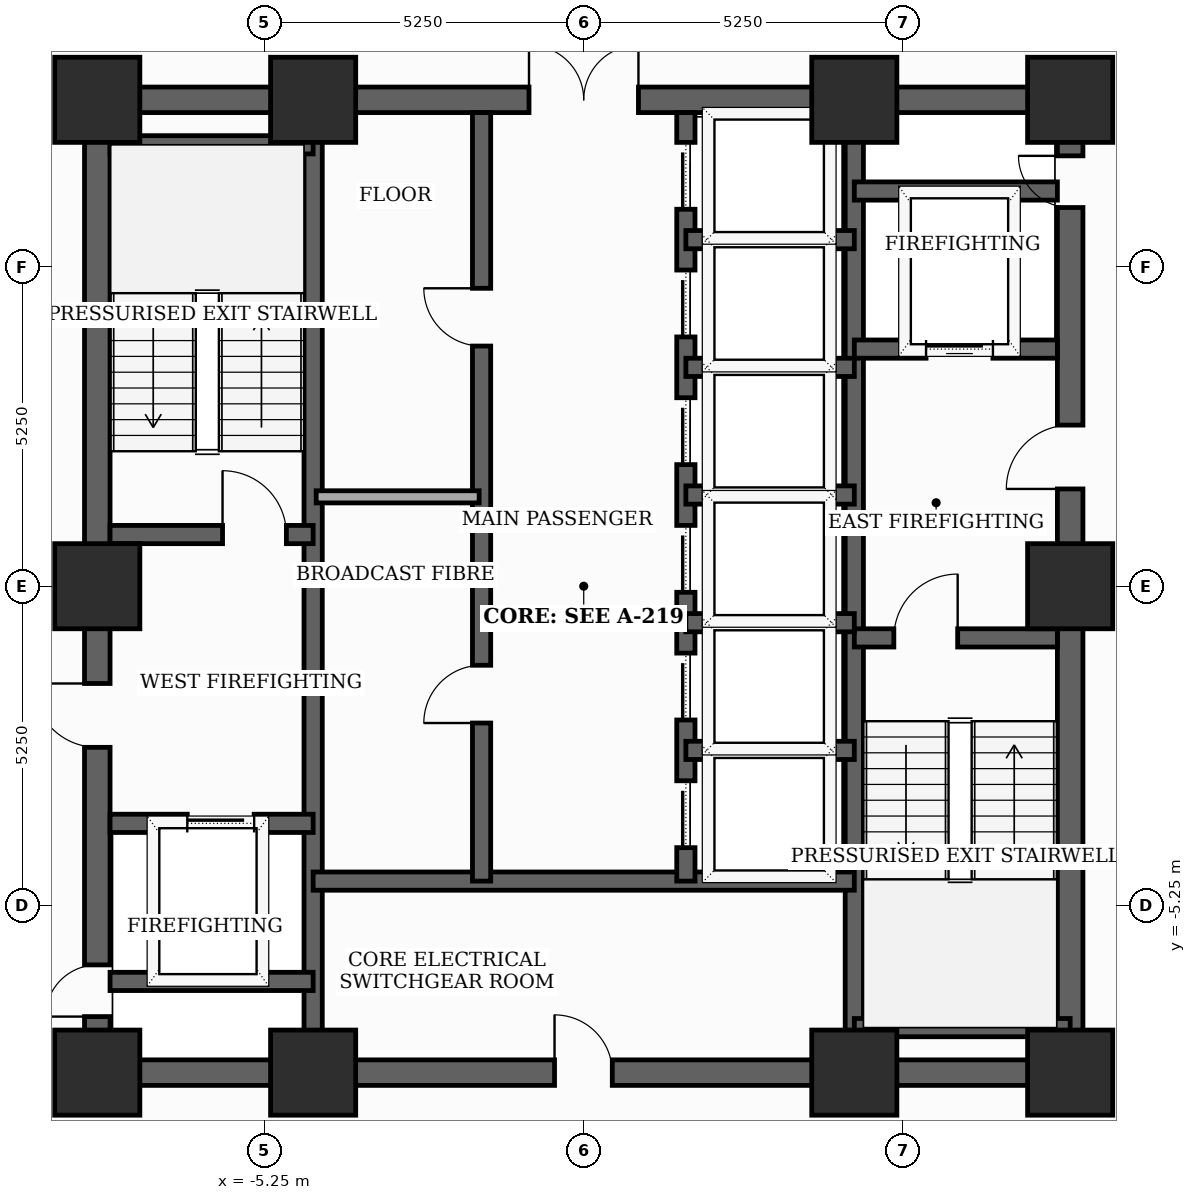
"""IFC4 building model, lengths in metres.
Left out: names, types, materials, properties, quantities, classifications, styles, units other than length and angle.
Written with IfcOpenShell. Run it as: python <this file> out.ifc"""

import sys

from ifc_helpers import new_model, si_unit, direction, frame, frame_2d, origin, origin_2d, place, context, subcontext, project, spatial, rectangle, extrude, element, fill, save


model = new_model("IFC4")
c1 = context("Model", 3, precision=1e-05, world=origin(), true_north=direction((0.0, 1.0)))
c2 = subcontext(c1, "Body", "Model", "MODEL_VIEW")
j1 = project(units=[si_unit("LENGTHUNIT", "METRE"), si_unit("PLANEANGLEUNIT", "RADIAN")], contexts=[c1])
p1 = place(None, origin())
s1 = spatial("IfcSite", under=j1, at=p1, CompositionType="ELEMENT")
p2 = place(p1, origin())
s2 = spatial("IfcBuilding", under=s1, at=p2, CompositionType="ELEMENT")
p3 = place(p2, frame((0.0, 0.0, 154.6)))
s3 = spatial("IfcBuildingStorey", under=s2, at=p3, CompositionType="ELEMENT", Elevation=154.6)
for number, where, z_axis, x_axis in (
    (1, (-8.0, -8.0, 0.0), (0.0, 0.0, 1.0), (1.0, 0.0, 0.0)),
    (2, (-4.45, -8.0, 0.0), (0.0, 0.0, 1.0), (1.0, 0.0, 0.0)),
    (3, (4.45, -8.0, 0.0), (0.0, 0.0, 1.0), (1.0, 0.0, 0.0)),
    (4, (8.0, -8.0, 0.0), (0.0, 0.0, 1.0), (1.0, 0.0, 0.0)),
    (5, (8.0, 0.0, 0.0), (0.0, 0.0, 1.0), (1.0, 0.0, 0.0)),
    (6, (8.0, 8.0, 0.0), (0.0, 0.0, 1.0), (1.0, 0.0, 0.0)),
    (7, (4.45, 8.0, 0.0), (0.0, 0.0, 1.0), (1.0, 0.0, 0.0)),
    (8, (-4.45, 8.0, 0.0), (0.0, 0.0, 1.0), (1.0, 0.0, 0.0)),
    (9, (-8.0, 8.0, 0.0), (0.0, 0.0, 1.0), (1.0, 0.0, 0.0)),
    (10, (-8.0, 0.0, 0.0), (0.0, 0.0, 1.0), (1.0, 0.0, 0.0)),
):
    element("IfcColumn", number, at=place(p3, frame(where, z_axis=z_axis, x_axis=x_axis)), inside=s3, PredefinedType="COLUMN", context=c2, shape_type="SweptSolid", body=[
        extrude(rectangle(XDim=1.4, YDim=1.4, at=origin_2d()), origin(), (0.0, 0.0, 1.0), 3.7),
    ])
p4 = place(p3, frame((-8.0, -8.0, 0.0), z_axis=(0.0, 0.0, 1.0), x_axis=(0.0, 1.0, 0.0)))
e11 = element("IfcWall", 11, at=p4, inside=s3, PredefinedType="SHEAR", context=c2, shape_type="SweptSolid", body=[
    extrude(rectangle(XDim=16.0, YDim=0.42, at=frame_2d((8.0, 0.0))), origin(), (0.0, 0.0, 1.0), 3.5),
])
p5 = place(p4, frame((0.922, 0.0, 0.0)))
e12 = element("IfcOpeningElement", 12, at=p5, cuts=e11, PredefinedType="OPENING", context=c2, shape_type="SweptSolid", body=[
    extrude(rectangle(XDim=0.85, YDim=2.02, at=frame_2d((0.425, 1.01))), frame((0.0, 0.22, 0.0), z_axis=(0.0, -1.0, 0.0), x_axis=(1.0, 0.0, 0.0)), (0.0, 0.0, 1.0), 0.44),
])
p6 = place(p4, frame((5.35, 0.0, 0.0)))
e13 = element("IfcOpeningElement", 13, at=p6, cuts=e11, PredefinedType="OPENING", context=c2, shape_type="SweptSolid", body=[
    extrude(rectangle(XDim=1.05, YDim=2.15, at=frame_2d((0.525, 1.075))), frame((0.0, 0.22, 0.0), z_axis=(0.0, -1.0, 0.0), x_axis=(1.0, 0.0, 0.0)), (0.0, 0.0, 1.0), 0.44),
])
p7 = place(p3, frame((8.0, -8.0, 0.0), z_axis=(0.0, 0.0, 1.0), x_axis=(0.0, 1.0, 0.0)))
e14 = element("IfcWall", 14, at=p7, inside=s3, PredefinedType="SHEAR", context=c2, shape_type="SweptSolid", body=[
    extrude(rectangle(XDim=16.0, YDim=0.42, at=frame_2d((8.0, 0.0))), origin(), (0.0, 0.0, 1.0), 3.5),
])
p8 = place(p7, frame((9.6, 0.0, 0.0)))
e15 = element("IfcOpeningElement", 15, at=p8, cuts=e14, PredefinedType="OPENING", context=c2, shape_type="SweptSolid", body=[
    extrude(rectangle(XDim=1.05, YDim=2.15, at=frame_2d((0.525, 1.075))), frame((0.0, 0.22, 0.0), z_axis=(0.0, -1.0, 0.0), x_axis=(1.0, 0.0, 0.0)), (0.0, 0.0, 1.0), 0.44),
])
p9 = place(p7, frame((14.229, 0.0, 0.0)))
e16 = element("IfcOpeningElement", 16, at=p9, cuts=e14, PredefinedType="OPENING", context=c2, shape_type="SweptSolid", body=[
    extrude(rectangle(XDim=0.85, YDim=2.02, at=frame_2d((0.425, 1.01))), frame((0.0, 0.22, 0.0), z_axis=(0.0, -1.0, 0.0), x_axis=(1.0, 0.0, 0.0)), (0.0, 0.0, 1.0), 0.44),
])
p10 = place(p3, frame((-8.0, -8.0, 0.0), z_axis=(0.0, 0.0, 1.0), x_axis=(1.0, 0.0, 0.0)))
e17 = element("IfcWall", 17, at=p10, inside=s3, PredefinedType="SHEAR", context=c2, shape_type="SweptSolid", body=[
    extrude(rectangle(XDim=16.0, YDim=0.42, at=frame_2d((8.0, 0.0))), origin(), (0.0, 0.0, 1.0), 3.5),
])
p11 = place(p10, frame((7.52, 0.0, 0.0)))
e18 = element("IfcOpeningElement", 18, at=p11, cuts=e17, PredefinedType="OPENING", context=c2, shape_type="SweptSolid", body=[
    extrude(rectangle(XDim=0.95, YDim=2.1, at=frame_2d((0.475, 1.05))), frame((0.0, 0.22, 0.0), z_axis=(0.0, -1.0, 0.0), x_axis=(1.0, 0.0, 0.0)), (0.0, 0.0, 1.0), 0.44),
])
p12 = place(p3, frame((-8.0, 8.0, 0.0), z_axis=(0.0, 0.0, 1.0), x_axis=(1.0, 0.0, 0.0)))
e19 = element("IfcWall", 19, at=p12, inside=s3, PredefinedType="SHEAR", context=c2, shape_type="SweptSolid", body=[
    extrude(rectangle(XDim=16.0, YDim=0.42, at=frame_2d((8.0, 0.0))), origin(), (0.0, 0.0, 1.0), 3.5),
])
p13 = place(p12, frame((7.1, 0.0, 0.0)))
e20 = element("IfcOpeningElement", 20, at=p13, cuts=e19, PredefinedType="OPENING", context=c2, shape_type="SweptSolid", body=[
    extrude(rectangle(XDim=1.8, YDim=2.15, at=frame_2d((0.9, 1.075))), frame((0.0, 0.22, 0.0), z_axis=(0.0, -1.0, 0.0), x_axis=(1.0, 0.0, 0.0)), (0.0, 0.0, 1.0), 0.44),
])
for number, where, z_axis, x_axis in (
    (21, (-4.45, -7.79, 0.0), (0.0, 0.0, 1.0), (0.0, 1.0, 0.0)),
    (22, (4.45, -7.79, 0.0), (0.0, 0.0, 1.0), (0.0, 1.0, 0.0)),
):
    element("IfcWall", number, at=place(p3, frame(where, z_axis=z_axis, x_axis=x_axis)), inside=s3, PredefinedType="SHEAR", context=c2, shape_type="SweptSolid", body=[
        extrude(rectangle(XDim=15.58, YDim=0.3, at=frame_2d((7.79, 0.0))), origin(), (0.0, 0.0, 1.0), 3.5),
    ])
p14 = place(p3, frame((-7.79, 0.85, 0.0), z_axis=(0.0, 0.0, 1.0), x_axis=(1.0, 0.0, 0.0)))
e23 = element("IfcWall", 23, at=p14, inside=s3, PredefinedType="SHEAR", context=c2, shape_type="SweptSolid", body=[
    extrude(rectangle(XDim=3.34, YDim=0.3, at=frame_2d((1.67, 0.0))), origin(), (0.0, 0.0, 1.0), 3.5),
])
p15 = place(p14, frame((1.85, 0.0, 0.0)))
e24 = element("IfcOpeningElement", 24, at=p15, cuts=e23, PredefinedType="OPENING", context=c2, shape_type="SweptSolid", body=[
    extrude(rectangle(XDim=1.05, YDim=2.15, at=frame_2d((0.525, 1.075))), frame((0.0, 0.16, 0.0), z_axis=(0.0, -1.0, 0.0), x_axis=(1.0, 0.0, 0.0)), (0.0, 0.0, 1.0), 0.32),
])
p16 = place(p3, frame((-7.79, 7.26, 0.0), z_axis=(0.0, 0.0, 1.0), x_axis=(1.0, 0.0, 0.0)))
e25 = element("IfcWall", 25, at=p16, inside=s3, PredefinedType="SHEAR", context=c2, shape_type="SweptSolid", body=[
    extrude(rectangle(XDim=3.34, YDim=0.3, at=frame_2d((1.67, 0.0))), origin(), (0.0, 0.0, 1.0), 3.5),
])
p17 = place(p3, frame((4.45, -0.85, 0.0), z_axis=(0.0, 0.0, 1.0), x_axis=(1.0, 0.0, 0.0)))
e26 = element("IfcWall", 26, at=p17, inside=s3, PredefinedType="SHEAR", context=c2, shape_type="SweptSolid", body=[
    extrude(rectangle(XDim=3.34, YDim=0.3, at=frame_2d((1.67, 0.0))), origin(), (0.0, 0.0, 1.0), 3.5),
])
p18 = place(p17, frame((0.65, 0.0, 0.0)))
e27 = element("IfcOpeningElement", 27, at=p18, cuts=e26, PredefinedType="OPENING", context=c2, shape_type="SweptSolid", body=[
    extrude(rectangle(XDim=1.05, YDim=2.15, at=frame_2d((0.525, 1.075))), frame((0.0, 0.16, 0.0), z_axis=(0.0, -1.0, 0.0), x_axis=(1.0, 0.0, 0.0)), (0.0, 0.0, 1.0), 0.32),
])
p19 = place(p3, frame((4.45, -7.26, 0.0), z_axis=(0.0, 0.0, 1.0), x_axis=(1.0, 0.0, 0.0)))
e28 = element("IfcWall", 28, at=p19, inside=s3, PredefinedType="SHEAR", context=c2, shape_type="SweptSolid", body=[
    extrude(rectangle(XDim=3.55, YDim=0.3, at=frame_2d((1.775, 0.0))), origin(), (0.0, 0.0, 1.0), 3.5),
])
p20 = place(p3, frame((-7.79, -3.9, 0.0), z_axis=(0.0, 0.0, 1.0), x_axis=(1.0, 0.0, 0.0)))
e29 = element("IfcWall", 29, at=p20, inside=s3, PredefinedType="SHEAR", context=c2, shape_type="SweptSolid", body=[
    extrude(rectangle(XDim=3.34, YDim=0.3, at=frame_2d((1.67, 0.0))), origin(), (0.0, 0.0, 1.0), 3.5),
])
p21 = place(p20, frame((1.27, 0.0, 0.0)))
e30 = element("IfcOpeningElement", 30, at=p21, cuts=e29, PredefinedType="OPENING", context=c2, shape_type="SweptSolid", body=[
    extrude(rectangle(XDim=1.1, YDim=2.1, at=frame_2d((0.55, 1.05))), frame((0.0, 0.16, 0.0), z_axis=(0.0, -1.0, 0.0), x_axis=(1.0, 0.0, 0.0)), (0.0, 0.0, 1.0), 0.32),
])
p22 = place(p3, frame((-7.79, -6.5, 0.0), z_axis=(0.0, 0.0, 1.0), x_axis=(1.0, 0.0, 0.0)))
e31 = element("IfcWall", 31, at=p22, inside=s3, PredefinedType="SHEAR", context=c2, shape_type="SweptSolid", body=[
    extrude(rectangle(XDim=3.34, YDim=0.3, at=frame_2d((1.67, 0.0))), origin(), (0.0, 0.0, 1.0), 3.5),
])
p23 = place(p3, frame((4.45, 3.9, 0.0), z_axis=(0.0, 0.0, 1.0), x_axis=(1.0, 0.0, 0.0)))
e32 = element("IfcWall", 32, at=p23, inside=s3, PredefinedType="SHEAR", context=c2, shape_type="SweptSolid", body=[
    extrude(rectangle(XDim=3.34, YDim=0.3, at=frame_2d((1.67, 0.0))), origin(), (0.0, 0.0, 1.0), 3.5),
])
p24 = place(p23, frame((1.18, 0.0, 0.0)))
e33 = element("IfcOpeningElement", 33, at=p24, cuts=e32, PredefinedType="OPENING", context=c2, shape_type="SweptSolid", body=[
    extrude(rectangle(XDim=1.1, YDim=2.1, at=frame_2d((0.55, 1.05))), frame((0.0, 0.16, 0.0), z_axis=(0.0, -1.0, 0.0), x_axis=(1.0, 0.0, 0.0)), (0.0, 0.0, 1.0), 0.32),
])
p25 = place(p3, frame((4.45, 6.5, 0.0), z_axis=(0.0, 0.0, 1.0), x_axis=(1.0, 0.0, 0.0)))
e34 = element("IfcWall", 34, at=p25, inside=s3, PredefinedType="SHEAR", context=c2, shape_type="SweptSolid", body=[
    extrude(rectangle(XDim=3.34, YDim=0.3, at=frame_2d((1.67, 0.0))), origin(), (0.0, 0.0, 1.0), 3.5),
])
p26 = place(p3, frame((-4.45, -4.85, 0.0), z_axis=(0.0, 0.0, 1.0), x_axis=(1.0, 0.0, 0.0)))
e35 = element("IfcWall", 35, at=p26, inside=s3, PredefinedType="SHEAR", context=c2, shape_type="SweptSolid", body=[
    extrude(rectangle(XDim=8.9, YDim=0.3, at=frame_2d((4.45, 0.0))), origin(), (0.0, 0.0, 1.0), 3.5),
])
p27 = place(p3, frame((-1.68, -4.85, 0.0), z_axis=(0.0, 0.0, 1.0), x_axis=(0.0, 1.0, 0.0)))
e36 = element("IfcWall", 36, at=p27, inside=s3, PredefinedType="SHEAR", context=c2, shape_type="SweptSolid", body=[
    extrude(rectangle(XDim=12.64, YDim=0.3, at=frame_2d((6.32, 0.0))), origin(), (0.0, 0.0, 1.0), 3.5),
])
p28 = place(p27, frame((2.6, 0.0, 0.0)))
e37 = element("IfcOpeningElement", 37, at=p28, cuts=e36, PredefinedType="OPENING", context=c2, shape_type="SweptSolid", body=[
    extrude(rectangle(XDim=0.95, YDim=2.1, at=frame_2d((0.475, 1.05))), frame((0.0, 0.16, 0.0), z_axis=(0.0, -1.0, 0.0), x_axis=(1.0, 0.0, 0.0)), (0.0, 0.0, 1.0), 0.32),
])
p29 = place(p27, frame((8.8, 0.0, 0.0)))
e38 = element("IfcOpeningElement", 38, at=p29, cuts=e36, PredefinedType="OPENING", context=c2, shape_type="SweptSolid", body=[
    extrude(rectangle(XDim=0.95, YDim=2.1, at=frame_2d((0.475, 1.05))), frame((0.0, 0.16, 0.0), z_axis=(0.0, -1.0, 0.0), x_axis=(1.0, 0.0, 0.0)), (0.0, 0.0, 1.0), 0.32),
])
p30 = place(p3, frame((1.68, -4.85, 0.0), z_axis=(0.0, 0.0, 1.0), x_axis=(0.0, 1.0, 0.0)))
e39 = element("IfcWall", 39, at=p30, inside=s3, PredefinedType="SHEAR", context=c2, shape_type="SweptSolid", body=[
    extrude(rectangle(XDim=12.64, YDim=0.3, at=frame_2d((6.32, 0.0))), origin(), (0.0, 0.0, 1.0), 3.5),
])
p31 = place(p30, frame((0.55, 0.0, 0.0)))
e40 = element("IfcOpeningElement", 40, at=p31, cuts=e39, PredefinedType="OPENING", context=c2, shape_type="SweptSolid", body=[
    extrude(rectangle(XDim=1.1, YDim=2.1, at=frame_2d((0.55, 1.05))), frame((0.0, 0.16, 0.0), z_axis=(0.0, -1.0, 0.0), x_axis=(1.0, 0.0, 0.0)), (0.0, 0.0, 1.0), 0.32),
])
p32 = place(p30, frame((2.65, 0.0, 0.0)))
e41 = element("IfcOpeningElement", 41, at=p32, cuts=e39, PredefinedType="OPENING", context=c2, shape_type="SweptSolid", body=[
    extrude(rectangle(XDim=1.1, YDim=2.1, at=frame_2d((0.55, 1.05))), frame((0.0, 0.16, 0.0), z_axis=(0.0, -1.0, 0.0), x_axis=(1.0, 0.0, 0.0)), (0.0, 0.0, 1.0), 0.32),
])
p33 = place(p30, frame((4.75, 0.0, 0.0)))
e42 = element("IfcOpeningElement", 42, at=p33, cuts=e39, PredefinedType="OPENING", context=c2, shape_type="SweptSolid", body=[
    extrude(rectangle(XDim=1.1, YDim=2.1, at=frame_2d((0.55, 1.05))), frame((0.0, 0.16, 0.0), z_axis=(0.0, -1.0, 0.0), x_axis=(1.0, 0.0, 0.0)), (0.0, 0.0, 1.0), 0.32),
])
p34 = place(p30, frame((6.85, 0.0, 0.0)))
e43 = element("IfcOpeningElement", 43, at=p34, cuts=e39, PredefinedType="OPENING", context=c2, shape_type="SweptSolid", body=[
    extrude(rectangle(XDim=1.1, YDim=2.1, at=frame_2d((0.55, 1.05))), frame((0.0, 0.16, 0.0), z_axis=(0.0, -1.0, 0.0), x_axis=(1.0, 0.0, 0.0)), (0.0, 0.0, 1.0), 0.32),
])
p35 = place(p30, frame((8.95, 0.0, 0.0)))
e44 = element("IfcOpeningElement", 44, at=p35, cuts=e39, PredefinedType="OPENING", context=c2, shape_type="SweptSolid", body=[
    extrude(rectangle(XDim=1.1, YDim=2.1, at=frame_2d((0.55, 1.05))), frame((0.0, 0.16, 0.0), z_axis=(0.0, -1.0, 0.0), x_axis=(1.0, 0.0, 0.0)), (0.0, 0.0, 1.0), 0.32),
])
p36 = place(p30, frame((11.05, 0.0, 0.0)))
e45 = element("IfcOpeningElement", 45, at=p36, cuts=e39, PredefinedType="OPENING", context=c2, shape_type="SweptSolid", body=[
    extrude(rectangle(XDim=1.1, YDim=2.1, at=frame_2d((0.55, 1.05))), frame((0.0, 0.16, 0.0), z_axis=(0.0, -1.0, 0.0), x_axis=(1.0, 0.0, 0.0)), (0.0, 0.0, 1.0), 0.32),
])
for number, where, z_axis, x_axis in (
    (46, (1.68, 1.5, 0.0), (0.0, 0.0, 1.0), (1.0, 0.0, 0.0)),
    (47, (1.68, 3.6, 0.0), (0.0, 0.0, 1.0), (1.0, 0.0, 0.0)),
    (48, (1.68, 5.7, 0.0), (0.0, 0.0, 1.0), (1.0, 0.0, 0.0)),
    (49, (1.68, -2.7, 0.0), (0.0, 0.0, 1.0), (1.0, 0.0, 0.0)),
    (50, (1.68, -0.6, 0.0), (0.0, 0.0, 1.0), (1.0, 0.0, 0.0)),
):
    element("IfcWall", number, at=place(p3, frame(where, z_axis=z_axis, x_axis=x_axis)), inside=s3, PredefinedType="SHEAR", context=c2, shape_type="SweptSolid", body=[
        extrude(rectangle(XDim=2.77, YDim=0.3, at=frame_2d((1.385, 0.0))), origin(), (0.0, 0.0, 1.0), 3.5),
    ])
p37 = place(p3, frame((-4.4, 1.47, 0.0), z_axis=(0.0, 0.0, 1.0), x_axis=(1.0, 0.0, 0.0)))
e51 = element("IfcWall", 51, at=p37, inside=s3, PredefinedType="SOLIDWALL", context=c2, shape_type="SweptSolid", body=[
    extrude(rectangle(XDim=2.68, YDim=0.2, at=frame_2d((1.34, 0.0))), origin(), (0.0, 0.0, 1.0), 3.5),
])
p38 = place(p5, origin())
e52 = element("IfcDoor", 52, at=p38, inside=s3, OperationType="SINGLE_SWING_LEFT", PredefinedType="TRAPDOOR", context=c2, shape_type="SweptSolid", body=[
    extrude(rectangle(XDim=0.85, YDim=2.02, at=frame_2d((0.425, 1.01))), frame((0.0, 0.025, 0.0), z_axis=(0.0, -1.0, 0.0), x_axis=(1.0, 0.0, 0.0)), (0.0, 0.0, 1.0), 0.05),
])
fill(e12, e52)
p39 = place(p6, origin())
e53 = element("IfcDoor", 53, at=p39, inside=s3, OperationType="SINGLE_SWING_RIGHT", PredefinedType="DOOR", context=c2, shape_type="SweptSolid", body=[
    extrude(rectangle(XDim=1.05, YDim=2.15, at=frame_2d((0.525, 1.075))), frame((0.0, 0.025, 0.0), z_axis=(0.0, -1.0, 0.0), x_axis=(1.0, 0.0, 0.0)), (0.0, 0.0, 1.0), 0.05),
])
fill(e13, e53)
p40 = place(p8, origin())
e54 = element("IfcDoor", 54, at=p40, inside=s3, OperationType="SINGLE_SWING_LEFT", PredefinedType="DOOR", context=c2, shape_type="SweptSolid", body=[
    extrude(rectangle(XDim=1.05, YDim=2.15, at=frame_2d((0.525, 1.075))), frame((0.0, 0.025, 0.0), z_axis=(0.0, -1.0, 0.0), x_axis=(1.0, 0.0, 0.0)), (0.0, 0.0, 1.0), 0.05),
])
fill(e15, e54)
p41 = place(p9, origin())
e55 = element("IfcDoor", 55, at=p41, inside=s3, OperationType="SINGLE_SWING_RIGHT", PredefinedType="TRAPDOOR", context=c2, shape_type="SweptSolid", body=[
    extrude(rectangle(XDim=0.85, YDim=2.02, at=frame_2d((0.425, 1.01))), frame((0.0, 0.025, 0.0), z_axis=(0.0, -1.0, 0.0), x_axis=(1.0, 0.0, 0.0)), (0.0, 0.0, 1.0), 0.05),
])
fill(e16, e55)
p42 = place(p11, origin())
e56 = element("IfcDoor", 56, at=p42, inside=s3, OperationType="SINGLE_SWING_LEFT", PredefinedType="DOOR", context=c2, shape_type="SweptSolid", body=[
    extrude(rectangle(XDim=0.95, YDim=2.1, at=frame_2d((0.475, 1.05))), frame((0.0, 0.025, 0.0), z_axis=(0.0, -1.0, 0.0), x_axis=(1.0, 0.0, 0.0)), (0.0, 0.0, 1.0), 0.05),
])
fill(e18, e56)
p43 = place(p13, origin())
e57 = element("IfcDoor", 57, at=p43, inside=s3, OperationType="DOUBLE_DOOR_SINGLE_SWING", PredefinedType="DOOR", context=c2, shape_type="SweptSolid", body=[
    extrude(rectangle(XDim=1.8, YDim=2.15, at=frame_2d((0.9, 1.075))), frame((0.0, 0.025, 0.0), z_axis=(0.0, -1.0, 0.0), x_axis=(1.0, 0.0, 0.0)), (0.0, 0.0, 1.0), 0.05),
])
fill(e20, e57)
p44 = place(p15, origin())
e58 = element("IfcDoor", 58, at=p44, inside=s3, OperationType="SINGLE_SWING_LEFT", PredefinedType="DOOR", context=c2, shape_type="SweptSolid", body=[
    extrude(rectangle(XDim=1.05, YDim=2.15, at=frame_2d((0.525, 1.075))), frame((0.0, 0.025, 0.0), z_axis=(0.0, -1.0, 0.0), x_axis=(1.0, 0.0, 0.0)), (0.0, 0.0, 1.0), 0.05),
])
fill(e24, e58)
p45 = place(p18, origin())
e59 = element("IfcDoor", 59, at=p45, inside=s3, OperationType="SINGLE_SWING_RIGHT", PredefinedType="DOOR", context=c2, shape_type="SweptSolid", body=[
    extrude(rectangle(XDim=1.05, YDim=2.15, at=frame_2d((0.525, 1.075))), frame((0.0, 0.025, 0.0), z_axis=(0.0, -1.0, 0.0), x_axis=(1.0, 0.0, 0.0)), (0.0, 0.0, 1.0), 0.05),
])
fill(e27, e59)
p46 = place(p21, origin())
e60 = element("IfcDoor", 60, at=p46, inside=s3, OperationType="SLIDING_TO_LEFT", PredefinedType="DOOR", context=c2, shape_type="SweptSolid", body=[
    extrude(rectangle(XDim=1.1, YDim=2.1, at=frame_2d((0.55, 1.05))), frame((0.0, 0.025, 0.0), z_axis=(0.0, -1.0, 0.0), x_axis=(1.0, 0.0, 0.0)), (0.0, 0.0, 1.0), 0.05),
])
fill(e30, e60)
p47 = place(p24, origin())
e61 = element("IfcDoor", 61, at=p47, inside=s3, OperationType="SLIDING_TO_LEFT", PredefinedType="DOOR", context=c2, shape_type="SweptSolid", body=[
    extrude(rectangle(XDim=1.1, YDim=2.1, at=frame_2d((0.55, 1.05))), frame((0.0, 0.025, 0.0), z_axis=(0.0, -1.0, 0.0), x_axis=(1.0, 0.0, 0.0)), (0.0, 0.0, 1.0), 0.05),
])
fill(e33, e61)
p48 = place(p28, origin())
e62 = element("IfcDoor", 62, at=p48, inside=s3, OperationType="SINGLE_SWING_LEFT", PredefinedType="DOOR", context=c2, shape_type="SweptSolid", body=[
    extrude(rectangle(XDim=0.95, YDim=2.1, at=frame_2d((0.475, 1.05))), frame((0.0, 0.025, 0.0), z_axis=(0.0, -1.0, 0.0), x_axis=(1.0, 0.0, 0.0)), (0.0, 0.0, 1.0), 0.05),
])
fill(e37, e62)
p49 = place(p29, origin())
e63 = element("IfcDoor", 63, at=p49, inside=s3, OperationType="SINGLE_SWING_RIGHT", PredefinedType="DOOR", context=c2, shape_type="SweptSolid", body=[
    extrude(rectangle(XDim=0.95, YDim=2.1, at=frame_2d((0.475, 1.05))), frame((0.0, 0.025, 0.0), z_axis=(0.0, -1.0, 0.0), x_axis=(1.0, 0.0, 0.0)), (0.0, 0.0, 1.0), 0.05),
])
fill(e38, e63)
p50 = place(p31, origin())
e64 = element("IfcDoor", 64, at=p50, inside=s3, OperationType="SLIDING_TO_LEFT", PredefinedType="DOOR", context=c2, shape_type="SweptSolid", body=[
    extrude(rectangle(XDim=1.1, YDim=2.1, at=frame_2d((0.55, 1.05))), frame((0.0, 0.025, 0.0), z_axis=(0.0, -1.0, 0.0), x_axis=(1.0, 0.0, 0.0)), (0.0, 0.0, 1.0), 0.05),
])
fill(e40, e64)
p51 = place(p32, origin())
e65 = element("IfcDoor", 65, at=p51, inside=s3, OperationType="SLIDING_TO_LEFT", PredefinedType="DOOR", context=c2, shape_type="SweptSolid", body=[
    extrude(rectangle(XDim=1.1, YDim=2.1, at=frame_2d((0.55, 1.05))), frame((0.0, 0.025, 0.0), z_axis=(0.0, -1.0, 0.0), x_axis=(1.0, 0.0, 0.0)), (0.0, 0.0, 1.0), 0.05),
])
fill(e41, e65)
p52 = place(p33, origin())
e66 = element("IfcDoor", 66, at=p52, inside=s3, OperationType="SLIDING_TO_LEFT", PredefinedType="DOOR", context=c2, shape_type="SweptSolid", body=[
    extrude(rectangle(XDim=1.1, YDim=2.1, at=frame_2d((0.55, 1.05))), frame((0.0, 0.025, 0.0), z_axis=(0.0, -1.0, 0.0), x_axis=(1.0, 0.0, 0.0)), (0.0, 0.0, 1.0), 0.05),
])
fill(e42, e66)
p53 = place(p34, origin())
e67 = element("IfcDoor", 67, at=p53, inside=s3, OperationType="SLIDING_TO_LEFT", PredefinedType="DOOR", context=c2, shape_type="SweptSolid", body=[
    extrude(rectangle(XDim=1.1, YDim=2.1, at=frame_2d((0.55, 1.05))), frame((0.0, 0.025, 0.0), z_axis=(0.0, -1.0, 0.0), x_axis=(1.0, 0.0, 0.0)), (0.0, 0.0, 1.0), 0.05),
])
fill(e43, e67)
p54 = place(p35, origin())
e68 = element("IfcDoor", 68, at=p54, inside=s3, OperationType="SLIDING_TO_LEFT", PredefinedType="DOOR", context=c2, shape_type="SweptSolid", body=[
    extrude(rectangle(XDim=1.1, YDim=2.1, at=frame_2d((0.55, 1.05))), frame((0.0, 0.025, 0.0), z_axis=(0.0, -1.0, 0.0), x_axis=(1.0, 0.0, 0.0)), (0.0, 0.0, 1.0), 0.05),
])
fill(e44, e68)
p55 = place(p36, origin())
e69 = element("IfcDoor", 69, at=p55, inside=s3, OperationType="SLIDING_TO_LEFT", PredefinedType="DOOR", context=c2, shape_type="SweptSolid", body=[
    extrude(rectangle(XDim=1.1, YDim=2.1, at=frame_2d((0.55, 1.05))), frame((0.0, 0.025, 0.0), z_axis=(0.0, -1.0, 0.0), x_axis=(1.0, 0.0, 0.0)), (0.0, 0.0, 1.0), 0.05),
])
fill(e45, e69)
save(model, sys.argv[1])
